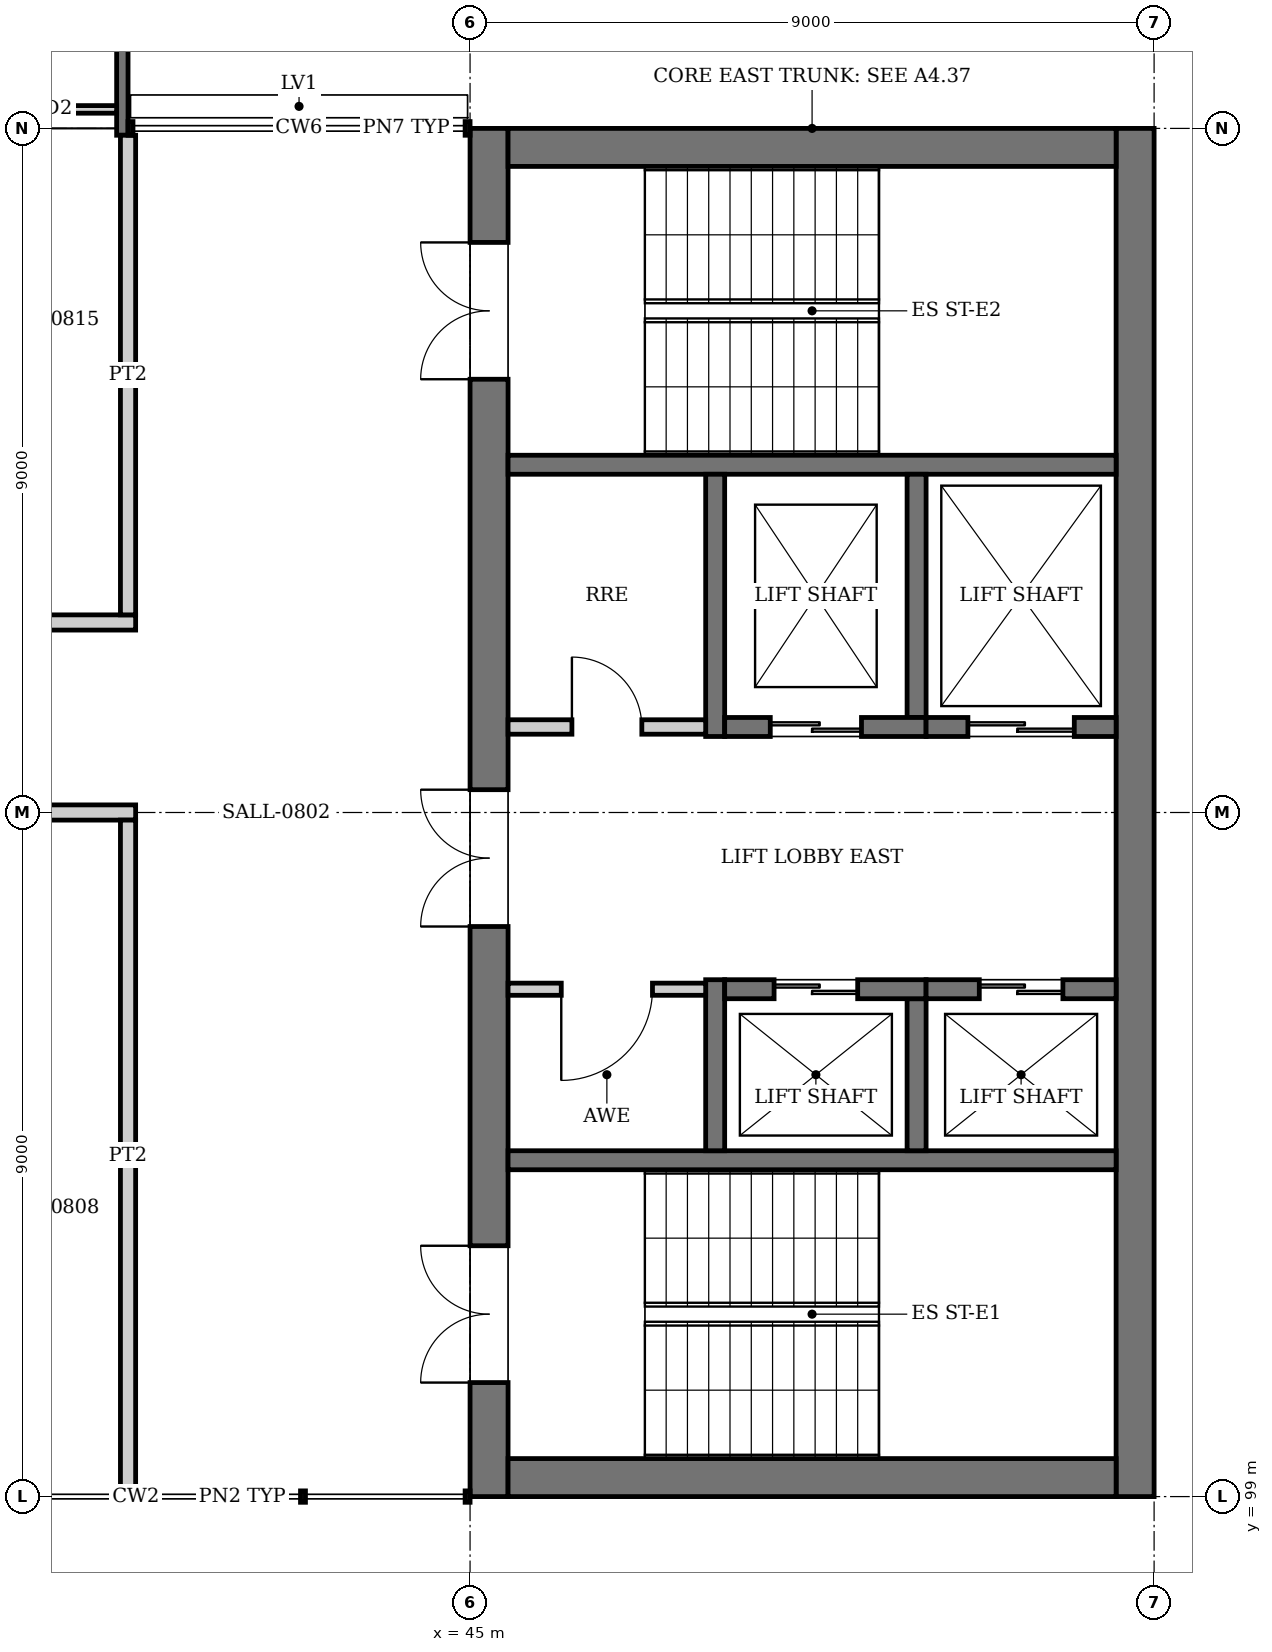
"""IFC4 building model, lengths in metres.
Left out: names, types, materials, properties, quantities, classifications, styles, units other than length and angle.
Written with IfcOpenShell. Run it as: python <this file> out.ifc"""

import sys

from ifc_helpers import new_model, si_unit, direction, frame, frame_2d, origin, place, context, subcontext, project, spatial, rectangle, extrude, element, fill, save


model = new_model("IFC4")
c1 = context("Model", 3, precision=1e-05, world=origin(), true_north=direction((0.0, 1.0)))
c2 = subcontext(c1, "Body", "Model", "MODEL_VIEW")
j1 = project(units=[si_unit("LENGTHUNIT", "METRE"), si_unit("PLANEANGLEUNIT", "RADIAN")], contexts=[c1])
p1 = place(None, origin())
s1 = spatial("IfcSite", under=j1, at=p1, CompositionType="ELEMENT")
p2 = place(p1, origin())
s2 = spatial("IfcBuilding", under=s1, at=p2, CompositionType="ELEMENT")
p3 = place(p2, frame((0.0, 0.0, 35.2)))
s3 = spatial("IfcBuildingStorey", under=s2, at=p3, CompositionType="ELEMENT", Elevation=35.2)
p4 = place(p3, frame((45.25, 99.0, 0.0), z_axis=(0.0, 0.0, 1.0), x_axis=(0.0, 1.0, 0.0)))
e1 = element("IfcWall", 1, at=p4, inside=s3, PredefinedType="SHEAR", context=c2, shape_type="SweptSolid", body=[
    extrude(rectangle(XDim=18.0, YDim=0.5, at=frame_2d((9.0, 0.0))), origin(), (0.0, 0.0, 1.0), 4.0),
])
p5 = place(p4, frame((1.5, 0.0, 0.0)))
e2 = element("IfcOpeningElement", 2, at=p5, cuts=e1, PredefinedType="OPENING", context=c2, shape_type="SweptSolid", body=[
    extrude(rectangle(XDim=1.8, YDim=2.1, at=frame_2d((0.9, 1.05))), frame((0.0, 0.26, 0.0), z_axis=(0.0, -1.0, 0.0), x_axis=(1.0, 0.0, 0.0)), (0.0, 0.0, 1.0), 0.52),
])
p6 = place(p4, frame((14.7, 0.0, 0.0)))
e3 = element("IfcOpeningElement", 3, at=p6, cuts=e1, PredefinedType="OPENING", context=c2, shape_type="SweptSolid", body=[
    extrude(rectangle(XDim=1.8, YDim=2.1, at=frame_2d((0.9, 1.05))), frame((0.0, 0.26, 0.0), z_axis=(0.0, -1.0, 0.0), x_axis=(1.0, 0.0, 0.0)), (0.0, 0.0, 1.0), 0.52),
])
p7 = place(p4, frame((7.5, 0.0, 0.0)))
e4 = element("IfcOpeningElement", 4, at=p7, cuts=e1, PredefinedType="OPENING", context=c2, shape_type="SweptSolid", body=[
    extrude(rectangle(XDim=1.8, YDim=2.1, at=frame_2d((0.9, 1.05))), frame((0.0, 0.26, 0.0), z_axis=(0.0, -1.0, 0.0), x_axis=(1.0, 0.0, 0.0)), (0.0, 0.0, 1.0), 0.52),
])
p8 = place(p3, frame((53.75, 99.0, 0.0), z_axis=(0.0, 0.0, 1.0), x_axis=(0.0, 1.0, 0.0)))
e5 = element("IfcWall", 5, at=p8, inside=s3, PredefinedType="SHEAR", context=c2, shape_type="SweptSolid", body=[
    extrude(rectangle(XDim=18.0, YDim=0.5, at=frame_2d((9.0, 0.0))), origin(), (0.0, 0.0, 1.0), 4.0),
])
for number, where, z_axis, x_axis in (
    (6, (45.5, 99.25, 0.0), (0.0, 0.0, 1.0), (1.0, 0.0, 0.0)),
    (7, (45.5, 116.75, 0.0), (0.0, 0.0, 1.0), (1.0, 0.0, 0.0)),
):
    element("IfcWall", number, at=place(p3, frame(where, z_axis=z_axis, x_axis=x_axis)), inside=s3, PredefinedType="SHEAR", context=c2, shape_type="SweptSolid", body=[
        extrude(rectangle(XDim=8.0, YDim=0.5, at=frame_2d((4.0, 0.0))), origin(), (0.0, 0.0, 1.0), 4.0),
    ])
p9 = place(p3, frame((40.425, 120.45, -0.15), z_axis=(0.0, 0.0, 1.0), x_axis=(0.0, -1.0, 0.0)))
e8 = element("IfcWall", 8, at=p9, inside=s3, PredefinedType="SOLIDWALL", context=c2, shape_type="SweptSolid", body=[
    extrude(rectangle(XDim=3.54, YDim=0.15, at=frame_2d((1.77, 0.0))), origin(), (0.0, 0.0, 1.0), 2.75),
])
p10 = place(p3, frame((36.15, 117.25, 0.0), z_axis=(0.0, 0.0, 1.0), x_axis=(1.0, 0.0, 0.0)))
e9 = element("IfcWall", 9, at=p10, inside=s3, PredefinedType="PARTITIONING", context=c2, shape_type="SweptSolid", body=[
    extrude(rectangle(XDim=4.2, YDim=0.1, at=frame_2d((2.1, 0.0))), origin(), (0.0, 0.0, 1.0), 2.6),
])
p11 = place(p10, frame((1.6, 0.0, 0.0)))
e10 = element("IfcOpeningElement", 10, at=p11, cuts=e9, PredefinedType="OPENING", context=c2, shape_type="SweptSolid", body=[
    extrude(rectangle(XDim=0.9, YDim=2.1, at=frame_2d((0.45, 1.05))), frame((0.0, 0.06, 0.0), z_axis=(0.0, -1.0, 0.0), x_axis=(1.0, 0.0, 0.0)), (0.0, 0.0, 1.0), 0.12),
])
for number, where, z_axis, x_axis in (
    (11, (45.5, 103.425, 0.0), (0.0, 0.0, 1.0), (1.0, 0.0, 0.0)),
    (12, (45.5, 112.575, 0.0), (0.0, 0.0, 1.0), (1.0, 0.0, 0.0)),
):
    element("IfcWall", number, at=place(p3, frame(where, z_axis=z_axis, x_axis=x_axis)), inside=s3, PredefinedType="SOLIDWALL", context=c2, shape_type="SweptSolid", body=[
        extrude(rectangle(XDim=8.0, YDim=0.25, at=frame_2d((4.0, 0.0))), origin(), (0.0, 0.0, 1.0), 3.75),
    ])
p12 = place(p3, frame((48.225, 103.55, 0.0), z_axis=(0.0, 0.0, 1.0), x_axis=(0.0, 1.0, 0.0)))
e13 = element("IfcWall", 13, at=p12, inside=s3, PredefinedType="SOLIDWALL", context=c2, shape_type="SweptSolid", body=[
    extrude(rectangle(XDim=2.25, YDim=0.25, at=frame_2d((1.125, 0.0))), origin(), (0.0, 0.0, 1.0), 4.0),
])
p13 = place(p3, frame((50.875, 103.55, 0.0), z_axis=(0.0, 0.0, 1.0), x_axis=(0.0, 1.0, 0.0)))
e14 = element("IfcWall", 14, at=p13, inside=s3, PredefinedType="SOLIDWALL", context=c2, shape_type="SweptSolid", body=[
    extrude(rectangle(XDim=2.0, YDim=0.25, at=frame_2d((1.0, 0.0))), origin(), (0.0, 0.0, 1.0), 4.0),
])
p14 = place(p3, frame((48.35, 105.675, 0.0), z_axis=(0.0, 0.0, 1.0), x_axis=(1.0, 0.0, 0.0)))
e15 = element("IfcWall", 15, at=p14, inside=s3, PredefinedType="SOLIDWALL", context=c2, shape_type="SweptSolid", body=[
    extrude(rectangle(XDim=2.65, YDim=0.25, at=frame_2d((1.325, 0.0))), origin(), (0.0, 0.0, 1.0), 4.0),
])
p15 = place(p14, frame((0.65, 0.0, 0.0)))
e16 = element("IfcOpeningElement", 16, at=p15, cuts=e15, PredefinedType="OPENING", context=c2, shape_type="SweptSolid", body=[
    extrude(rectangle(XDim=1.1, YDim=2.1, at=frame_2d((0.55, 1.05))), frame((0.0, 0.135, 0.0), z_axis=(0.0, -1.0, 0.0), x_axis=(1.0, 0.0, 0.0)), (0.0, 0.0, 1.0), 0.27),
])
p16 = place(p3, frame((51.0, 105.675, 0.0), z_axis=(0.0, 0.0, 1.0), x_axis=(1.0, 0.0, 0.0)))
e17 = element("IfcWall", 17, at=p16, inside=s3, PredefinedType="SOLIDWALL", context=c2, shape_type="SweptSolid", body=[
    extrude(rectangle(XDim=2.5, YDim=0.25, at=frame_2d((1.25, 0.0))), origin(), (0.0, 0.0, 1.0), 4.0),
])
p17 = place(p16, frame((0.7, 0.0, 0.0)))
e18 = element("IfcOpeningElement", 18, at=p17, cuts=e17, PredefinedType="OPENING", context=c2, shape_type="SweptSolid", body=[
    extrude(rectangle(XDim=1.1, YDim=2.1, at=frame_2d((0.55, 1.05))), frame((0.0, 0.135, 0.0), z_axis=(0.0, -1.0, 0.0), x_axis=(1.0, 0.0, 0.0)), (0.0, 0.0, 1.0), 0.27),
])
p18 = place(p3, frame((48.225, 109.0, 0.0), z_axis=(0.0, 0.0, 1.0), x_axis=(0.0, 1.0, 0.0)))
e19 = element("IfcWall", 19, at=p18, inside=s3, PredefinedType="SOLIDWALL", context=c2, shape_type="SweptSolid", body=[
    extrude(rectangle(XDim=3.45, YDim=0.25, at=frame_2d((1.725, 0.0))), origin(), (0.0, 0.0, 1.0), 4.0),
])
p19 = place(p3, frame((50.875, 109.25, 0.0), z_axis=(0.0, 0.0, 1.0), x_axis=(0.0, 1.0, 0.0)))
e20 = element("IfcWall", 20, at=p19, inside=s3, PredefinedType="SOLIDWALL", context=c2, shape_type="SweptSolid", body=[
    extrude(rectangle(XDim=3.2, YDim=0.25, at=frame_2d((1.6, 0.0))), origin(), (0.0, 0.0, 1.0), 4.0),
])
p20 = place(p3, frame((48.35, 109.125, 0.0), z_axis=(0.0, 0.0, 1.0), x_axis=(1.0, 0.0, 0.0)))
e21 = element("IfcWall", 21, at=p20, inside=s3, PredefinedType="SOLIDWALL", context=c2, shape_type="SweptSolid", body=[
    extrude(rectangle(XDim=2.65, YDim=0.25, at=frame_2d((1.325, 0.0))), origin(), (0.0, 0.0, 1.0), 4.0),
])
p21 = place(p20, frame((0.6, 0.0, 0.0)))
e22 = element("IfcOpeningElement", 22, at=p21, cuts=e21, PredefinedType="OPENING", context=c2, shape_type="SweptSolid", body=[
    extrude(rectangle(XDim=1.2, YDim=2.1, at=frame_2d((0.6, 1.05))), frame((0.0, 0.135, 0.0), z_axis=(0.0, -1.0, 0.0), x_axis=(1.0, 0.0, 0.0)), (0.0, 0.0, 1.0), 0.27),
])
p22 = place(p3, frame((51.0, 109.125, 0.0), z_axis=(0.0, 0.0, 1.0), x_axis=(1.0, 0.0, 0.0)))
e23 = element("IfcWall", 23, at=p22, inside=s3, PredefinedType="SOLIDWALL", context=c2, shape_type="SweptSolid", body=[
    extrude(rectangle(XDim=2.5, YDim=0.25, at=frame_2d((1.25, 0.0))), origin(), (0.0, 0.0, 1.0), 4.0),
])
p23 = place(p22, frame((0.55, 0.0, 0.0)))
e24 = element("IfcOpeningElement", 24, at=p23, cuts=e23, PredefinedType="OPENING", context=c2, shape_type="SweptSolid", body=[
    extrude(rectangle(XDim=1.4, YDim=2.4, at=frame_2d((0.7, 1.2))), frame((0.0, 0.135, 0.0), z_axis=(0.0, -1.0, 0.0), x_axis=(1.0, 0.0, 0.0)), (0.0, 0.0, 1.0), 0.27),
])
p24 = place(p3, frame((45.5, 105.675, 0.0), z_axis=(0.0, 0.0, 1.0), x_axis=(1.0, 0.0, 0.0)))
e25 = element("IfcWall", 25, at=p24, inside=s3, PredefinedType="PARTITIONING", context=c2, shape_type="SweptSolid", body=[
    extrude(rectangle(XDim=2.6, YDim=0.16, at=frame_2d((1.3, 0.0))), origin(), (0.0, 0.0, 1.0), 3.75),
])
p25 = place(p24, frame((0.7, 0.0, 0.0)))
e26 = element("IfcOpeningElement", 26, at=p25, cuts=e25, PredefinedType="OPENING", context=c2, shape_type="SweptSolid", body=[
    extrude(rectangle(XDim=1.2, YDim=2.1, at=frame_2d((0.6, 1.05))), frame((0.0, 0.09, 0.0), z_axis=(0.0, -1.0, 0.0), x_axis=(1.0, 0.0, 0.0)), (0.0, 0.0, 1.0), 0.18),
])
p26 = place(p3, frame((45.5, 109.125, 0.0), z_axis=(0.0, 0.0, 1.0), x_axis=(1.0, 0.0, 0.0)))
e27 = element("IfcWall", 27, at=p26, inside=s3, PredefinedType="PARTITIONING", context=c2, shape_type="SweptSolid", body=[
    extrude(rectangle(XDim=2.6, YDim=0.19, at=frame_2d((1.3, 0.0))), origin(), (0.0, 0.0, 1.0), 3.75),
])
p27 = place(p26, frame((0.84, 0.0, 0.0)))
e28 = element("IfcOpeningElement", 28, at=p27, cuts=e27, PredefinedType="OPENING", context=c2, shape_type="SweptSolid", body=[
    extrude(rectangle(XDim=0.92, YDim=2.1, at=frame_2d((0.46, 1.05))), frame((0.0, 0.105, 0.0), z_axis=(0.0, -1.0, 0.0), x_axis=(1.0, 0.0, 0.0)), (0.0, 0.0, 1.0), 0.21),
])
p28 = place(p3, frame((18.08, 108.0, 0.0), z_axis=(0.0, 0.0, 1.0), x_axis=(1.0, 0.0, 0.0)))
e29 = element("IfcWall", 29, at=p28, inside=s3, PredefinedType="PARTITIONING", context=c2, shape_type="SweptSolid", body=[
    extrude(rectangle(XDim=22.52, YDim=0.2, at=frame_2d((11.26, 0.0))), origin(), (0.0, 0.0, 1.0), 3.05),
])
p29 = place(p28, frame((5.77, 0.0, 0.0)))
e30 = element("IfcOpeningElement", 30, at=p29, cuts=e29, PredefinedType="OPENING", context=c2, shape_type="SweptSolid", body=[
    extrude(rectangle(XDim=1.8, YDim=2.1, at=frame_2d((0.9, 1.05))), frame((0.0, 0.11, 0.0), z_axis=(0.0, -1.0, 0.0), x_axis=(1.0, 0.0, 0.0)), (0.0, 0.0, 1.0), 0.22),
])
p30 = place(p28, frame((15.17, 0.0, 0.0)))
e31 = element("IfcOpeningElement", 31, at=p30, cuts=e29, PredefinedType="OPENING", context=c2, shape_type="SweptSolid", body=[
    extrude(rectangle(XDim=1.0, YDim=2.1, at=frame_2d((0.5, 1.05))), frame((0.0, 0.11, 0.0), z_axis=(0.0, -1.0, 0.0), x_axis=(1.0, 0.0, 0.0)), (0.0, 0.0, 1.0), 0.22),
])
p31 = place(p28, frame((19.67, 0.0, 0.0)))
e32 = element("IfcOpeningElement", 32, at=p31, cuts=e29, PredefinedType="OPENING", context=c2, shape_type="SweptSolid", body=[
    extrude(rectangle(XDim=1.0, YDim=2.1, at=frame_2d((0.5, 1.05))), frame((0.0, 0.11, 0.0), z_axis=(0.0, -1.0, 0.0), x_axis=(1.0, 0.0, 0.0)), (0.0, 0.0, 1.0), 0.22),
])
p32 = place(p3, frame((13.4, 110.5, 0.0), z_axis=(0.0, 0.0, 1.0), x_axis=(1.0, 0.0, 0.0)))
e33 = element("IfcWall", 33, at=p32, inside=s3, PredefinedType="PARTITIONING", context=c2, shape_type="SweptSolid", body=[
    extrude(rectangle(XDim=27.2, YDim=0.2, at=frame_2d((13.6, 0.0))), origin(), (0.0, 0.0, 1.0), 3.05),
])
p33 = place(p32, frame((6.35, 0.0, 0.0)))
e34 = element("IfcOpeningElement", 34, at=p33, cuts=e33, PredefinedType="OPENING", context=c2, shape_type="SweptSolid", body=[
    extrude(rectangle(XDim=1.0, YDim=2.1, at=frame_2d((0.5, 1.05))), frame((0.0, 0.11, 0.0), z_axis=(0.0, -1.0, 0.0), x_axis=(1.0, 0.0, 0.0)), (0.0, 0.0, 1.0), 0.22),
])
p34 = place(p32, frame((10.85, 0.0, 0.0)))
e35 = element("IfcOpeningElement", 35, at=p34, cuts=e33, PredefinedType="OPENING", context=c2, shape_type="SweptSolid", body=[
    extrude(rectangle(XDim=1.0, YDim=2.1, at=frame_2d((0.5, 1.05))), frame((0.0, 0.11, 0.0), z_axis=(0.0, -1.0, 0.0), x_axis=(1.0, 0.0, 0.0)), (0.0, 0.0, 1.0), 0.22),
])
p35 = place(p32, frame((15.35, 0.0, 0.0)))
e36 = element("IfcOpeningElement", 36, at=p35, cuts=e33, PredefinedType="OPENING", context=c2, shape_type="SweptSolid", body=[
    extrude(rectangle(XDim=1.0, YDim=2.1, at=frame_2d((0.5, 1.05))), frame((0.0, 0.11, 0.0), z_axis=(0.0, -1.0, 0.0), x_axis=(1.0, 0.0, 0.0)), (0.0, 0.0, 1.0), 0.22),
])
p36 = place(p32, frame((19.85, 0.0, 0.0)))
e37 = element("IfcOpeningElement", 37, at=p36, cuts=e33, PredefinedType="OPENING", context=c2, shape_type="SweptSolid", body=[
    extrude(rectangle(XDim=1.0, YDim=2.1, at=frame_2d((0.5, 1.05))), frame((0.0, 0.11, 0.0), z_axis=(0.0, -1.0, 0.0), x_axis=(1.0, 0.0, 0.0)), (0.0, 0.0, 1.0), 0.22),
])
p37 = place(p32, frame((24.35, 0.0, 0.0)))
e38 = element("IfcOpeningElement", 38, at=p37, cuts=e33, PredefinedType="OPENING", context=c2, shape_type="SweptSolid", body=[
    extrude(rectangle(XDim=1.0, YDim=2.1, at=frame_2d((0.5, 1.05))), frame((0.0, 0.11, 0.0), z_axis=(0.0, -1.0, 0.0), x_axis=(1.0, 0.0, 0.0)), (0.0, 0.0, 1.0), 0.22),
])
p38 = place(p3, frame((40.5, 99.075, 0.0), z_axis=(0.0, 0.0, 1.0), x_axis=(0.0, 1.0, 0.0)))
e39 = element("IfcWall", 39, at=p38, inside=s3, PredefinedType="PARTITIONING", context=c2, shape_type="SweptSolid", body=[
    extrude(rectangle(XDim=8.825, YDim=0.2, at=frame_2d((4.413, 0.0))), origin(), (0.0, 0.0, 1.0), 3.05),
])
p39 = place(p3, frame((40.5, 110.6, 0.0), z_axis=(0.0, 0.0, 1.0), x_axis=(0.0, 1.0, 0.0)))
e40 = element("IfcWall", 40, at=p39, inside=s3, PredefinedType="PARTITIONING", context=c2, shape_type="SweptSolid", body=[
    extrude(rectangle(XDim=6.31, YDim=0.2, at=frame_2d((3.155, 0.0))), origin(), (0.0, 0.0, 1.0), 3.05),
])
p40 = place(p15, origin())
e41 = element("IfcDoor", 41, at=p40, inside=s3, OperationType="DOUBLE_DOOR_SLIDING", PredefinedType="DOOR", context=c2, shape_type="SweptSolid", body=[
    extrude(rectangle(XDim=1.1, YDim=2.1, at=frame_2d((0.55, 1.05))), frame((0.0, 0.025, 0.0), z_axis=(0.0, -1.0, 0.0), x_axis=(1.0, 0.0, 0.0)), (0.0, 0.0, 1.0), 0.05),
])
fill(e16, e41)
p41 = place(p17, origin())
e42 = element("IfcDoor", 42, at=p41, inside=s3, OperationType="DOUBLE_DOOR_SLIDING", PredefinedType="DOOR", context=c2, shape_type="SweptSolid", body=[
    extrude(rectangle(XDim=1.1, YDim=2.1, at=frame_2d((0.55, 1.05))), frame((0.0, 0.025, 0.0), z_axis=(0.0, -1.0, 0.0), x_axis=(1.0, 0.0, 0.0)), (0.0, 0.0, 1.0), 0.05),
])
fill(e18, e42)
p42 = place(p21, origin())
e43 = element("IfcDoor", 43, at=p42, inside=s3, OperationType="DOUBLE_DOOR_SLIDING", PredefinedType="DOOR", context=c2, shape_type="SweptSolid", body=[
    extrude(rectangle(XDim=1.2, YDim=2.1, at=frame_2d((0.6, 1.05))), frame((0.0, 0.025, 0.0), z_axis=(0.0, -1.0, 0.0), x_axis=(1.0, 0.0, 0.0)), (0.0, 0.0, 1.0), 0.05),
])
fill(e22, e43)
p43 = place(p23, origin())
e44 = element("IfcDoor", 44, at=p43, inside=s3, OperationType="DOUBLE_DOOR_SLIDING", PredefinedType="DOOR", context=c2, shape_type="SweptSolid", body=[
    extrude(rectangle(XDim=1.4, YDim=2.4, at=frame_2d((0.7, 1.2))), frame((0.0, 0.025, 0.0), z_axis=(0.0, -1.0, 0.0), x_axis=(1.0, 0.0, 0.0)), (0.0, 0.0, 1.0), 0.05),
])
fill(e24, e44)
p44 = place(p5, origin())
e45 = element("IfcDoor", 45, at=p44, inside=s3, OperationType="DOUBLE_DOOR_SINGLE_SWING", PredefinedType="DOOR", context=c2, shape_type="SweptSolid", body=[
    extrude(rectangle(XDim=1.8, YDim=2.1, at=frame_2d((0.9, 1.05))), frame((0.0, 0.025, 0.0), z_axis=(0.0, -1.0, 0.0), x_axis=(1.0, 0.0, 0.0)), (0.0, 0.0, 1.0), 0.05),
])
fill(e2, e45)
p45 = place(p6, origin())
e46 = element("IfcDoor", 46, at=p45, inside=s3, OperationType="DOUBLE_DOOR_SINGLE_SWING", PredefinedType="DOOR", context=c2, shape_type="SweptSolid", body=[
    extrude(rectangle(XDim=1.8, YDim=2.1, at=frame_2d((0.9, 1.05))), frame((0.0, 0.025, 0.0), z_axis=(0.0, -1.0, 0.0), x_axis=(1.0, 0.0, 0.0)), (0.0, 0.0, 1.0), 0.05),
])
fill(e3, e46)
p46 = place(p7, origin())
e47 = element("IfcDoor", 47, at=p46, inside=s3, OperationType="DOUBLE_DOOR_SINGLE_SWING", PredefinedType="DOOR", context=c2, shape_type="SweptSolid", body=[
    extrude(rectangle(XDim=1.8, YDim=2.1, at=frame_2d((0.9, 1.05))), frame((0.0, 0.025, 0.0), z_axis=(0.0, -1.0, 0.0), x_axis=(1.0, 0.0, 0.0)), (0.0, 0.0, 1.0), 0.05),
])
fill(e4, e47)
p47 = place(p25, frame((1.2, 0.0, 0.0), z_axis=(0.0, 0.0, 1.0), x_axis=(-1.0, 0.0, 0.0)))
e48 = element("IfcDoor", 48, at=p47, inside=s3, OperationType="SINGLE_SWING_RIGHT", PredefinedType="DOOR", context=c2, shape_type="SweptSolid", body=[
    extrude(rectangle(XDim=1.2, YDim=2.1, at=frame_2d((0.6, 1.05))), frame((0.0, 0.025, 0.0), z_axis=(0.0, -1.0, 0.0), x_axis=(1.0, 0.0, 0.0)), (0.0, 0.0, 1.0), 0.05),
])
fill(e26, e48)
p48 = place(p27, origin())
e49 = element("IfcDoor", 49, at=p48, inside=s3, OperationType="SINGLE_SWING_LEFT", PredefinedType="DOOR", context=c2, shape_type="SweptSolid", body=[
    extrude(rectangle(XDim=0.92, YDim=2.1, at=frame_2d((0.46, 1.05))), frame((0.0, 0.025, 0.0), z_axis=(0.0, -1.0, 0.0), x_axis=(1.0, 0.0, 0.0)), (0.0, 0.0, 1.0), 0.05),
])
fill(e28, e49)
save(model, sys.argv[1])
